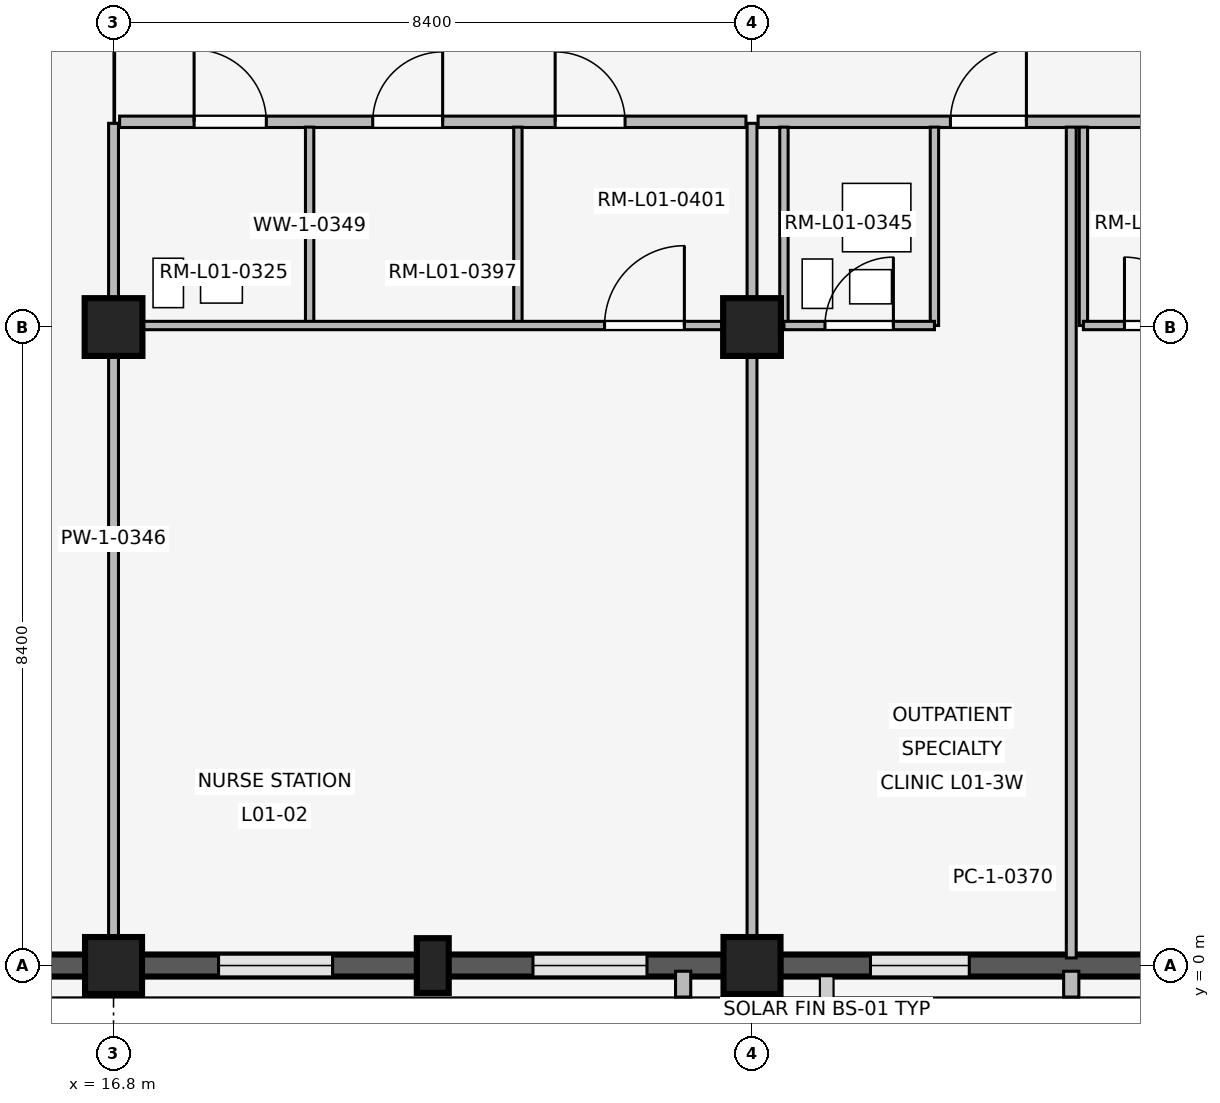
"""IFC4 building model, lengths in metres.
Left out: names, types, materials, properties, quantities, classifications, styles, units other than length and angle.
Written with IfcOpenShell. Run it as: python <this file> out.ifc"""

import sys

from ifc_helpers import new_model, si_unit, direction, frame, frame_2d, origin, origin_2d, place, context, subcontext, project, spatial, rectangle, extrude, element, fill, save


model = new_model("IFC4")
c1 = context("Model", 3, precision=1e-05, world=origin(), true_north=direction((0.0, 1.0)))
c2 = subcontext(c1, "Body", "Model", "MODEL_VIEW")
j1 = project(units=[si_unit("LENGTHUNIT", "METRE"), si_unit("PLANEANGLEUNIT", "RADIAN")], contexts=[c1])
p1 = place(None, origin())
s1 = spatial("IfcSite", under=j1, at=p1, CompositionType="ELEMENT")
p2 = place(p1, origin())
s2 = spatial("IfcBuilding", under=s1, at=p2, CompositionType="ELEMENT")
p3 = place(p2, frame((0.0, 0.0, 4.8)))
s3 = spatial("IfcBuildingStorey", under=s2, at=p3, CompositionType="ELEMENT", Elevation=4.8)
p4 = place(p3, frame((16.8, 0.0, 0.0), z_axis=(0.0, 0.0, 1.0), x_axis=(1.0, 0.0, 0.0)))
e1 = element("IfcColumn", 1, at=p4, inside=s3, PredefinedType="COLUMN", context=c2, shape_type="SweptSolid", body=[
    extrude(rectangle(XDim=0.75, YDim=0.75, at=origin_2d()), origin(), (0.0, 0.0, 1.0), 3.3),
])
p5 = place(p3, frame((16.8, 8.4, 0.0), z_axis=(0.0, 0.0, 1.0), x_axis=(1.0, 0.0, 0.0)))
e2 = element("IfcColumn", 2, at=p5, inside=s3, PredefinedType="COLUMN", context=c2, shape_type="SweptSolid", body=[
    extrude(rectangle(XDim=0.76, YDim=0.76, at=origin_2d()), origin(), (0.0, 0.0, 1.0), 3.3),
])
p6 = place(p3, frame((25.2, 0.0, 0.0), z_axis=(0.0, 0.0, 1.0), x_axis=(1.0, 0.0, 0.0)))
e3 = element("IfcColumn", 3, at=p6, inside=s3, PredefinedType="COLUMN", context=c2, shape_type="SweptSolid", body=[
    extrude(rectangle(XDim=0.75, YDim=0.75, at=origin_2d()), origin(), (0.0, 0.0, 1.0), 3.3),
])
p7 = place(p3, frame((25.2, 8.4, 0.0), z_axis=(0.0, 0.0, 1.0), x_axis=(1.0, 0.0, 0.0)))
e4 = element("IfcColumn", 4, at=p7, inside=s3, PredefinedType="COLUMN", context=c2, shape_type="SweptSolid", body=[
    extrude(rectangle(XDim=0.76, YDim=0.76, at=origin_2d()), origin(), (0.0, 0.0, 1.0), 3.3),
])
p8 = place(p3, frame((21.0, 0.0, 0.0), z_axis=(0.0, 0.0, 1.0), x_axis=(1.0, 0.0, 0.0)))
e5 = element("IfcColumn", 5, at=p8, inside=s3, PredefinedType="PILASTER", context=c2, shape_type="SweptSolid", body=[
    extrude(rectangle(XDim=0.42, YDim=0.72, at=origin_2d()), origin(), (0.0, 0.0, 1.0), 3.3),
])
p9 = place(p3, frame((16.43, 0.0, 0.0), z_axis=(0.0, 0.0, 1.0), x_axis=(-1.0, 0.0, 0.0)))
e6 = element("IfcWall", 6, at=p9, inside=s3, PredefinedType="SOLIDWALL", context=c2, shape_type="SweptSolid", body=[
    extrude(rectangle(XDim=7.66, YDim=0.29, at=frame_2d((3.83, 0.0))), origin(), (0.0, 0.0, 1.0), 2.42),
])
p10 = place(p9, frame((1.188, 0.0, 1.05)))
e7 = element("IfcOpeningElement", 7, at=p10, cuts=e6, PredefinedType="OPENING", context=c2, shape_type="SweptSolid", body=[
    extrude(rectangle(XDim=1.3, YDim=0.75, at=frame_2d((0.65, 0.375))), frame((0.0, 0.155, 0.0), z_axis=(0.0, -1.0, 0.0), x_axis=(1.0, 0.0, 0.0)), (0.0, 0.0, 1.0), 0.31),
])
p11 = place(p9, frame((5.172, 0.0, 1.05)))
e8 = element("IfcOpeningElement", 8, at=p11, cuts=e6, PredefinedType="OPENING", context=c2, shape_type="SweptSolid", body=[
    extrude(rectangle(XDim=1.3, YDim=0.75, at=frame_2d((0.65, 0.375))), frame((0.0, 0.155, 0.0), z_axis=(0.0, -1.0, 0.0), x_axis=(1.0, 0.0, 0.0)), (0.0, 0.0, 1.0), 0.31),
])
p12 = place(p3, frame((24.83, 0.0, 0.0), z_axis=(0.0, 0.0, 1.0), x_axis=(-1.0, 0.0, 0.0)))
e9 = element("IfcWall", 9, at=p12, inside=s3, PredefinedType="SOLIDWALL", context=c2, shape_type="SweptSolid", body=[
    extrude(rectangle(XDim=7.66, YDim=0.29, at=frame_2d((3.83, 0.0))), origin(), (0.0, 0.0, 1.0), 2.42),
])
p13 = place(p12, frame((1.012, 0.0, 1.05)))
e10 = element("IfcOpeningElement", 10, at=p13, cuts=e9, PredefinedType="OPENING", context=c2, shape_type="SweptSolid", body=[
    extrude(rectangle(XDim=1.5, YDim=0.75, at=frame_2d((0.75, 0.375))), frame((0.0, 0.155, 0.0), z_axis=(0.0, -1.0, 0.0), x_axis=(1.0, 0.0, 0.0)), (0.0, 0.0, 1.0), 0.31),
])
p14 = place(p12, frame((5.148, 0.0, 1.05)))
e11 = element("IfcOpeningElement", 11, at=p14, cuts=e9, PredefinedType="OPENING", context=c2, shape_type="SweptSolid", body=[
    extrude(rectangle(XDim=1.5, YDim=0.75, at=frame_2d((0.75, 0.375))), frame((0.0, 0.155, 0.0), z_axis=(0.0, -1.0, 0.0), x_axis=(1.0, 0.0, 0.0)), (0.0, 0.0, 1.0), 0.31),
])
p15 = place(p3, frame((24.294, -0.075, 0.0), z_axis=(0.0, 0.0, 1.0), x_axis=(0.0, -1.0, 0.0)))
e12 = element("IfcWall", 12, at=p15, inside=s3, PredefinedType="ELEMENTEDWALL", context=c2, shape_type="SweptSolid", body=[
    extrude(rectangle(XDim=0.34, YDim=0.2, at=frame_2d((0.17, 0.0))), origin(), (0.0, 0.0, 1.0), 2.4),
])
p16 = place(p3, frame((33.23, 0.0, 0.0), z_axis=(0.0, 0.0, 1.0), x_axis=(-1.0, 0.0, 0.0)))
e13 = element("IfcWall", 13, at=p16, inside=s3, PredefinedType="SOLIDWALL", context=c2, shape_type="SweptSolid", body=[
    extrude(rectangle(XDim=7.66, YDim=0.29, at=frame_2d((3.83, 0.0))), origin(), (0.0, 0.0, 1.0), 2.42),
])
p17 = place(p16, frame((1.188, 0.0, 1.05)))
e14 = element("IfcOpeningElement", 14, at=p17, cuts=e13, PredefinedType="OPENING", context=c2, shape_type="SweptSolid", body=[
    extrude(rectangle(XDim=1.3, YDim=0.75, at=frame_2d((0.65, 0.375))), frame((0.0, 0.155, 0.0), z_axis=(0.0, -1.0, 0.0), x_axis=(1.0, 0.0, 0.0)), (0.0, 0.0, 1.0), 0.31),
])
p18 = place(p16, frame((5.172, 0.0, 1.05)))
e15 = element("IfcOpeningElement", 15, at=p18, cuts=e13, PredefinedType="OPENING", context=c2, shape_type="SweptSolid", body=[
    extrude(rectangle(XDim=1.3, YDim=0.75, at=frame_2d((0.65, 0.375))), frame((0.0, 0.155, 0.0), z_axis=(0.0, -1.0, 0.0), x_axis=(1.0, 0.0, 0.0)), (0.0, 0.0, 1.0), 0.31),
])
p19 = place(p3, frame((29.4, -0.075, 0.0), z_axis=(0.0, 0.0, 1.0), x_axis=(0.0, -1.0, 0.0)))
e16 = element("IfcWall", 16, at=p19, inside=s3, PredefinedType="ELEMENTEDWALL", context=c2, shape_type="SweptSolid", body=[
    extrude(rectangle(XDim=0.34, YDim=0.2, at=frame_2d((0.17, 0.0))), origin(), (0.0, 0.0, 1.0), 2.4),
])
p20 = place(p3, frame((16.8, 0.14, 0.0), z_axis=(0.0, 0.0, 1.0), x_axis=(0.0, 1.0, 0.0)))
e17 = element("IfcWall", 17, at=p20, inside=s3, PredefinedType="PARTITIONING", context=c2, shape_type="SweptSolid", body=[
    extrude(rectangle(XDim=10.94, YDim=0.13, at=frame_2d((5.47, 0.0))), origin(), (0.0, 0.0, 1.0), 2.4),
])
p21 = place(p3, frame((16.88, 11.1, 0.0), z_axis=(0.0, 0.0, 1.0), x_axis=(1.0, 0.0, 0.0)))
e18 = element("IfcWall", 18, at=p21, inside=s3, PredefinedType="PARTITIONING", context=c2, shape_type="SweptSolid", body=[
    extrude(rectangle(XDim=8.24, YDim=0.15, at=frame_2d((4.12, 0.0))), origin(), (0.0, 0.0, 1.0), 2.4),
])
p22 = place(p21, frame((0.98, 0.0, 0.0)))
e19 = element("IfcOpeningElement", 19, at=p22, cuts=e18, PredefinedType="OPENING", context=c2, shape_type="SweptSolid", body=[
    extrude(rectangle(XDim=0.95, YDim=2.15, at=frame_2d((0.475, 1.075))), frame((0.0, 0.085, 0.0), z_axis=(0.0, -1.0, 0.0), x_axis=(1.0, 0.0, 0.0)), (0.0, 0.0, 1.0), 0.17),
])
p23 = place(p21, frame((3.33, 0.0, 0.0)))
e20 = element("IfcOpeningElement", 20, at=p23, cuts=e18, PredefinedType="OPENING", context=c2, shape_type="SweptSolid", body=[
    extrude(rectangle(XDim=0.92, YDim=2.1, at=frame_2d((0.46, 1.05))), frame((0.0, 0.085, 0.0), z_axis=(0.0, -1.0, 0.0), x_axis=(1.0, 0.0, 0.0)), (0.0, 0.0, 1.0), 0.17),
])
p24 = place(p21, frame((5.73, 0.0, 0.0)))
e21 = element("IfcOpeningElement", 21, at=p24, cuts=e18, PredefinedType="OPENING", context=c2, shape_type="SweptSolid", body=[
    extrude(rectangle(XDim=0.92, YDim=2.1, at=frame_2d((0.46, 1.05))), frame((0.0, 0.085, 0.0), z_axis=(0.0, -1.0, 0.0), x_axis=(1.0, 0.0, 0.0)), (0.0, 0.0, 1.0), 0.17),
])
for number, where, z_axis, x_axis in (
    (22, (19.38, 8.44, 0.0), (0.0, 0.0, 1.0), (0.0, 1.0, 0.0)),
    (23, (22.12, 8.44, 0.0), (0.0, 0.0, 1.0), (0.0, 1.0, 0.0)),
):
    element("IfcWall", number, at=place(p3, frame(where, z_axis=z_axis, x_axis=x_axis)), inside=s3, PredefinedType="PARTITIONING", context=c2, shape_type="SweptSolid", body=[
        extrude(rectangle(XDim=2.59, YDim=0.11, at=frame_2d((1.295, 0.0))), origin(), (0.0, 0.0, 1.0), 2.4),
    ])
p25 = place(p3, frame((16.88, 8.42, 0.0), z_axis=(0.0, 0.0, 1.0), x_axis=(1.0, 0.0, 0.0)))
e24 = element("IfcWall", 24, at=p25, inside=s3, PredefinedType="PARTITIONING", context=c2, shape_type="SweptSolid", body=[
    extrude(rectangle(XDim=8.24, YDim=0.11, at=frame_2d((4.12, 0.0))), origin(), (0.0, 0.0, 1.0), 2.4),
])
p26 = place(p25, frame((6.38, 0.0, 0.0)))
e25 = element("IfcOpeningElement", 25, at=p26, cuts=e24, PredefinedType="OPENING", context=c2, shape_type="SweptSolid", body=[
    extrude(rectangle(XDim=1.05, YDim=2.2, at=frame_2d((0.525, 1.1))), frame((0.0, 0.065, 0.0), z_axis=(0.0, -1.0, 0.0), x_axis=(1.0, 0.0, 0.0)), (0.0, 0.0, 1.0), 0.13),
])
p27 = place(p3, frame((25.2, 0.14, 0.0), z_axis=(0.0, 0.0, 1.0), x_axis=(0.0, 1.0, 0.0)))
e26 = element("IfcWall", 26, at=p27, inside=s3, PredefinedType="PARTITIONING", context=c2, shape_type="SweptSolid", body=[
    extrude(rectangle(XDim=10.94, YDim=0.13, at=frame_2d((5.47, 0.0))), origin(), (0.0, 0.0, 1.0), 2.4),
])
p28 = place(p3, frame((25.28, 11.1, 0.0), z_axis=(0.0, 0.0, 1.0), x_axis=(1.0, 0.0, 0.0)))
e27 = element("IfcWall", 27, at=p28, inside=s3, PredefinedType="PARTITIONING", context=c2, shape_type="SweptSolid", body=[
    extrude(rectangle(XDim=8.24, YDim=0.15, at=frame_2d((4.12, 0.0))), origin(), (0.0, 0.0, 1.0), 2.4),
])
p29 = place(p28, frame((2.53, 0.0, 0.0)))
e28 = element("IfcOpeningElement", 28, at=p29, cuts=e27, PredefinedType="OPENING", context=c2, shape_type="SweptSolid", body=[
    extrude(rectangle(XDim=1.0, YDim=2.15, at=frame_2d((0.5, 1.075))), frame((0.0, 0.085, 0.0), z_axis=(0.0, -1.0, 0.0), x_axis=(1.0, 0.0, 0.0)), (0.0, 0.0, 1.0), 0.17),
])
p30 = place(p28, frame((6.23, 0.0, 0.0)))
e29 = element("IfcOpeningElement", 29, at=p30, cuts=e27, PredefinedType="OPENING", context=c2, shape_type="SweptSolid", body=[
    extrude(rectangle(XDim=1.0, YDim=2.15, at=frame_2d((0.5, 1.075))), frame((0.0, 0.085, 0.0), z_axis=(0.0, -1.0, 0.0), x_axis=(1.0, 0.0, 0.0)), (0.0, 0.0, 1.0), 0.17),
])
p31 = place(p3, frame((29.4, 0.1, 0.0), z_axis=(0.0, 0.0, 1.0), x_axis=(0.0, 1.0, 0.0)))
e30 = element("IfcWall", 30, at=p31, inside=s3, PredefinedType="PARTITIONING", context=c2, shape_type="SweptSolid", body=[
    extrude(rectangle(XDim=10.93, YDim=0.13, at=frame_2d((5.465, 0.0))), origin(), (0.0, 0.0, 1.0), 2.4),
])
for number, where, z_axis, x_axis in (
    (31, (25.62, 8.42, 0.0), (0.0, 0.0, 1.0), (0.0, 1.0, 0.0)),
    (32, (27.6, 8.42, 0.0), (0.0, 0.0, 1.0), (0.0, 1.0, 0.0)),
):
    element("IfcWall", number, at=place(p3, frame(where, z_axis=z_axis, x_axis=x_axis)), inside=s3, PredefinedType="PARTITIONING", context=c2, shape_type="SweptSolid", body=[
        extrude(rectangle(XDim=2.61, YDim=0.11, at=frame_2d((1.305, 0.0))), origin(), (0.0, 0.0, 1.0), 2.4),
    ])
p32 = place(p3, frame((25.62, 8.42, 0.0), z_axis=(0.0, 0.0, 1.0), x_axis=(1.0, 0.0, 0.0)))
e33 = element("IfcWall", 33, at=p32, inside=s3, PredefinedType="PARTITIONING", context=c2, shape_type="SweptSolid", body=[
    extrude(rectangle(XDim=1.98, YDim=0.11, at=frame_2d((0.99, 0.0))), origin(), (0.0, 0.0, 1.0), 2.4),
])
p33 = place(p32, frame((0.54, 0.0, 0.0)))
e34 = element("IfcOpeningElement", 34, at=p33, cuts=e33, PredefinedType="OPENING", context=c2, shape_type="SweptSolid", body=[
    extrude(rectangle(XDim=0.9, YDim=2.1, at=frame_2d((0.45, 1.05))), frame((0.0, 0.065, 0.0), z_axis=(0.0, -1.0, 0.0), x_axis=(1.0, 0.0, 0.0)), (0.0, 0.0, 1.0), 0.13),
])
p34 = place(p3, frame((29.56, 8.42, 0.0), z_axis=(0.0, 0.0, 1.0), x_axis=(0.0, 1.0, 0.0)))
e35 = element("IfcWall", 35, at=p34, inside=s3, PredefinedType="PARTITIONING", context=c2, shape_type="SweptSolid", body=[
    extrude(rectangle(XDim=2.61, YDim=0.11, at=frame_2d((1.305, 0.0))), origin(), (0.0, 0.0, 1.0), 2.4),
])
p35 = place(p3, frame((29.56, 8.42, 0.0), z_axis=(0.0, 0.0, 1.0), x_axis=(1.0, 0.0, 0.0)))
e36 = element("IfcWall", 36, at=p35, inside=s3, PredefinedType="PARTITIONING", context=c2, shape_type="SweptSolid", body=[
    extrude(rectangle(XDim=1.98, YDim=0.11, at=frame_2d((0.99, 0.0))), origin(), (0.0, 0.0, 1.0), 2.4),
])
p36 = place(p35, frame((0.54, 0.0, 0.0)))
e37 = element("IfcOpeningElement", 37, at=p36, cuts=e36, PredefinedType="OPENING", context=c2, shape_type="SweptSolid", body=[
    extrude(rectangle(XDim=0.9, YDim=2.1, at=frame_2d((0.45, 1.05))), frame((0.0, 0.065, 0.0), z_axis=(0.0, -1.0, 0.0), x_axis=(1.0, 0.0, 0.0)), (0.0, 0.0, 1.0), 0.13),
])
p37 = place(p3, frame((28.05, 1.15, 0.0), z_axis=(0.0, 0.0, 1.0), x_axis=(1.0, 0.0, 0.0)))
e38 = element("IfcWall", 38, at=p37, inside=s3, PredefinedType="PLUMBINGWALL", context=c2, shape_type="SweptSolid", body=[
    extrude(rectangle(XDim=0.9, YDim=0.24, at=frame_2d((0.45, 0.0))), origin(), (0.0, 0.0, 1.0), 2.4),
])
p38 = place(p13, origin())
e39 = element("IfcWindow", 39, at=p38, inside=s3, PartitioningType="SINGLE_PANEL", PredefinedType="WINDOW", context=c2, shape_type="SweptSolid", body=[
    extrude(rectangle(XDim=1.5, YDim=0.75, at=frame_2d((0.75, 0.375))), frame((0.0, 0.03, 0.0), z_axis=(0.0, -1.0, 0.0), x_axis=(1.0, 0.0, 0.0)), (0.0, 0.0, 1.0), 0.06),
])
fill(e10, e39)
p39 = place(p14, origin())
e40 = element("IfcWindow", 40, at=p39, inside=s3, PartitioningType="SINGLE_PANEL", PredefinedType="WINDOW", context=c2, shape_type="SweptSolid", body=[
    extrude(rectangle(XDim=1.5, YDim=0.75, at=frame_2d((0.75, 0.375))), frame((0.0, 0.03, 0.0), z_axis=(0.0, -1.0, 0.0), x_axis=(1.0, 0.0, 0.0)), (0.0, 0.0, 1.0), 0.06),
])
fill(e11, e40)
p40 = place(p18, origin())
e41 = element("IfcWindow", 41, at=p40, inside=s3, PartitioningType="SINGLE_PANEL", PredefinedType="WINDOW", context=c2, shape_type="SweptSolid", body=[
    extrude(rectangle(XDim=1.3, YDim=0.75, at=frame_2d((0.65, 0.375))), frame((0.0, 0.03, 0.0), z_axis=(0.0, -1.0, 0.0), x_axis=(1.0, 0.0, 0.0)), (0.0, 0.0, 1.0), 0.06),
])
fill(e15, e41)
p41 = place(p22, origin())
e42 = element("IfcDoor", 42, at=p41, inside=s3, OperationType="SINGLE_SWING_LEFT", PredefinedType="DOOR", context=c2, shape_type="SweptSolid", body=[
    extrude(rectangle(XDim=0.95, YDim=2.15, at=frame_2d((0.475, 1.075))), frame((0.0, 0.025, 0.0), z_axis=(0.0, -1.0, 0.0), x_axis=(1.0, 0.0, 0.0)), (0.0, 0.0, 1.0), 0.05),
])
fill(e19, e42)
p42 = place(p23, origin())
e43 = element("IfcDoor", 43, at=p42, inside=s3, OperationType="SINGLE_SWING_RIGHT", PredefinedType="DOOR", context=c2, shape_type="SweptSolid", body=[
    extrude(rectangle(XDim=0.92, YDim=2.1, at=frame_2d((0.46, 1.05))), frame((0.0, 0.025, 0.0), z_axis=(0.0, -1.0, 0.0), x_axis=(1.0, 0.0, 0.0)), (0.0, 0.0, 1.0), 0.05),
])
fill(e20, e43)
p43 = place(p24, origin())
e44 = element("IfcDoor", 44, at=p43, inside=s3, OperationType="SINGLE_SWING_LEFT", PredefinedType="DOOR", context=c2, shape_type="SweptSolid", body=[
    extrude(rectangle(XDim=0.92, YDim=2.1, at=frame_2d((0.46, 1.05))), frame((0.0, 0.025, 0.0), z_axis=(0.0, -1.0, 0.0), x_axis=(1.0, 0.0, 0.0)), (0.0, 0.0, 1.0), 0.05),
])
fill(e21, e44)
p44 = place(p26, origin())
e45 = element("IfcDoor", 45, at=p44, inside=s3, OperationType="SINGLE_SWING_RIGHT", PredefinedType="DOOR", context=c2, shape_type="SweptSolid", body=[
    extrude(rectangle(XDim=1.05, YDim=2.2, at=frame_2d((0.525, 1.1))), frame((0.0, 0.025, 0.0), z_axis=(0.0, -1.0, 0.0), x_axis=(1.0, 0.0, 0.0)), (0.0, 0.0, 1.0), 0.05),
])
fill(e25, e45)
p45 = place(p29, origin())
e46 = element("IfcDoor", 46, at=p45, inside=s3, OperationType="SINGLE_SWING_RIGHT", PredefinedType="DOOR", context=c2, shape_type="SweptSolid", body=[
    extrude(rectangle(XDim=1.0, YDim=2.15, at=frame_2d((0.5, 1.075))), frame((0.0, 0.025, 0.0), z_axis=(0.0, -1.0, 0.0), x_axis=(1.0, 0.0, 0.0)), (0.0, 0.0, 1.0), 0.05),
])
fill(e28, e46)
p46 = place(p33, origin())
e47 = element("IfcDoor", 47, at=p46, inside=s3, OperationType="SINGLE_SWING_RIGHT", PredefinedType="DOOR", context=c2, shape_type="SweptSolid", body=[
    extrude(rectangle(XDim=0.9, YDim=2.1, at=frame_2d((0.45, 1.05))), frame((0.0, 0.025, 0.0), z_axis=(0.0, -1.0, 0.0), x_axis=(1.0, 0.0, 0.0)), (0.0, 0.0, 1.0), 0.05),
])
fill(e34, e47)
p47 = place(p36, origin())
e48 = element("IfcDoor", 48, at=p47, inside=s3, OperationType="SINGLE_SWING_LEFT", PredefinedType="DOOR", context=c2, shape_type="SweptSolid", body=[
    extrude(rectangle(XDim=0.9, YDim=2.1, at=frame_2d((0.45, 1.05))), frame((0.0, 0.025, 0.0), z_axis=(0.0, -1.0, 0.0), x_axis=(1.0, 0.0, 0.0)), (0.0, 0.0, 1.0), 0.05),
])
fill(e37, e48)
save(model, sys.argv[1])
